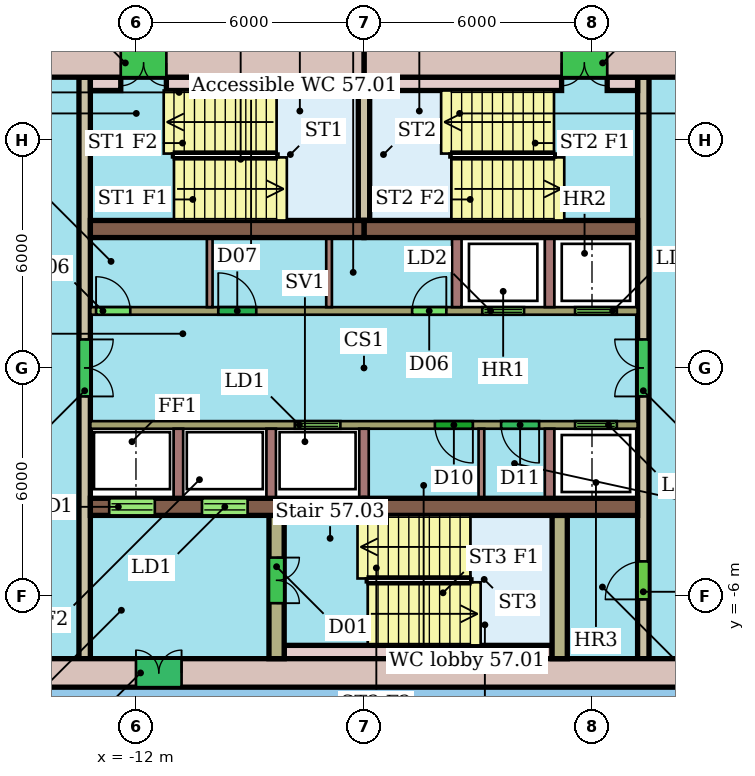
"""IFC4 building model, lengths in metres.
Left out: names, types, materials, properties, quantities, classifications, styles, units other than length and angle.
Written with IfcOpenShell. Run it as: python <this file> out.ifc"""

import sys

from ifc_helpers import new_model, si_unit, direction, frame, frame_2d, origin, place, context, subcontext, project, spatial, rectangle, extrude, element, fill, save


model = new_model("IFC4")
c1 = context("Model", 3, precision=1e-05, world=origin(), true_north=direction((0.0, 1.0)))
c2 = subcontext(c1, "Body", "Model", "MODEL_VIEW")
j1 = project(units=[si_unit("LENGTHUNIT", "METRE"), si_unit("PLANEANGLEUNIT", "RADIAN")], contexts=[c1])
p1 = place(None, origin())
s1 = spatial("IfcSite", under=j1, at=p1, CompositionType="ELEMENT")
p2 = place(p1, origin())
s2 = spatial("IfcBuilding", under=s1, at=p2, CompositionType="ELEMENT")
p3 = place(p2, frame((0.0, 0.0, 231.7)))
s3 = spatial("IfcBuildingStorey", under=s2, at=p3, CompositionType="ELEMENT", Elevation=231.7)
p4 = place(p3, frame((4.8, 8.025, 0.0), z_axis=(0.0, 0.0, 1.0), x_axis=(-1.0, 0.0, 0.0)))
e1 = element("IfcWall", 1, at=p4, inside=s3, PredefinedType="SHEAR", context=c2, shape_type="SweptSolid", body=[
    extrude(rectangle(XDim=10.8, YDim=0.75, at=frame_2d((5.4, 0.0))), origin(), (0.0, 0.0, 1.0), 3.3),
])
p5 = place(p4, frame((4.4, 0.0, 0.0)))
e2 = element("IfcOpeningElement", 2, at=p5, cuts=e1, PredefinedType="OPENING", context=c2, shape_type="SweptSolid", body=[
    extrude(rectangle(XDim=1.2, YDim=2.1, at=frame_2d((0.6, 1.05))), frame((0.0, 0.385, 0.0), z_axis=(0.0, -1.0, 0.0), x_axis=(1.0, 0.0, 0.0)), (0.0, 0.0, 1.0), 0.77),
])
p6 = place(p3, frame((-6.0, 8.025, 0.0), z_axis=(0.0, 0.0, 1.0), x_axis=(-1.0, 0.0, 0.0)))
e3 = element("IfcWall", 3, at=p6, inside=s3, PredefinedType="SHEAR", context=c2, shape_type="SweptSolid", body=[
    extrude(rectangle(XDim=10.8, YDim=0.75, at=frame_2d((5.4, 0.0))), origin(), (0.0, 0.0, 1.0), 3.3),
])
p7 = place(p6, frame((5.2, 0.0, 0.0)))
e4 = element("IfcOpeningElement", 4, at=p7, cuts=e3, PredefinedType="OPENING", context=c2, shape_type="SweptSolid", body=[
    extrude(rectangle(XDim=1.2, YDim=2.1, at=frame_2d((0.6, 1.05))), frame((0.0, 0.385, 0.0), z_axis=(0.0, -1.0, 0.0), x_axis=(1.0, 0.0, 0.0)), (0.0, 0.0, 1.0), 0.77),
])
p8 = place(p3, frame((-16.8, -8.025, 0.0), z_axis=(0.0, 0.0, 1.0), x_axis=(1.0, 0.0, 0.0)))
e5 = element("IfcWall", 5, at=p8, inside=s3, PredefinedType="SHEAR", context=c2, shape_type="SweptSolid", body=[
    extrude(rectangle(XDim=21.6, YDim=0.75, at=frame_2d((10.8, 0.0))), origin(), (0.0, 0.0, 1.0), 3.3),
])
p9 = place(p8, frame((4.8, 0.0, 0.0)))
e6 = element("IfcOpeningElement", 6, at=p9, cuts=e5, PredefinedType="OPENING", context=c2, shape_type="SweptSolid", body=[
    extrude(rectangle(XDim=1.2, YDim=2.1, at=frame_2d((0.6, 1.05))), frame((0.0, 0.385, 0.0), z_axis=(0.0, -1.0, 0.0), x_axis=(1.0, 0.0, 0.0)), (0.0, 0.0, 1.0), 0.77),
])
for number, where, z_axis, x_axis in (
    (7, (-13.2, 3.655, 0.0), (0.0, 0.0, 1.0), (1.0, 0.0, 0.0)),
    (8, (-6.0, 3.655, 0.0), (0.0, 0.0, 1.0), (1.0, 0.0, 0.0)),
):
    element("IfcWall", number, at=place(p3, frame(where, z_axis=z_axis, x_axis=x_axis)), inside=s3, PredefinedType="SHEAR", context=c2, shape_type="SweptSolid", body=[
        extrude(rectangle(XDim=7.2, YDim=0.45, at=frame_2d((3.6, 0.0))), origin(), (0.0, 0.0, 1.0), 3.3),
    ])
p10 = place(p3, frame((-13.2, -3.655, 0.0), z_axis=(0.0, 0.0, 1.0), x_axis=(1.0, 0.0, 0.0)))
e9 = element("IfcWall", 9, at=p10, inside=s3, PredefinedType="SHEAR", context=c2, shape_type="SweptSolid", body=[
    extrude(rectangle(XDim=7.2, YDim=0.45, at=frame_2d((3.6, 0.0))), origin(), (0.0, 0.0, 1.0), 3.3),
])
p11 = place(p10, frame((0.496, 0.0, 0.0)))
e10 = element("IfcOpeningElement", 10, at=p11, cuts=e9, PredefinedType="OPENING", context=c2, shape_type="SweptSolid", body=[
    extrude(rectangle(XDim=1.2, YDim=2.1, at=frame_2d((0.6, 1.05))), frame((0.0, 0.235, 0.0), z_axis=(0.0, -1.0, 0.0), x_axis=(1.0, 0.0, 0.0)), (0.0, 0.0, 1.0), 0.47),
])
p12 = place(p10, frame((2.938, 0.0, 0.0)))
e11 = element("IfcOpeningElement", 11, at=p12, cuts=e9, PredefinedType="OPENING", context=c2, shape_type="SweptSolid", body=[
    extrude(rectangle(XDim=1.2, YDim=2.1, at=frame_2d((0.6, 1.05))), frame((0.0, 0.235, 0.0), z_axis=(0.0, -1.0, 0.0), x_axis=(1.0, 0.0, 0.0)), (0.0, 0.0, 1.0), 0.47),
])
p13 = place(p3, frame((-6.0, -3.655, 0.0), z_axis=(0.0, 0.0, 1.0), x_axis=(1.0, 0.0, 0.0)))
e12 = element("IfcWall", 12, at=p13, inside=s3, PredefinedType="SHEAR", context=c2, shape_type="SweptSolid", body=[
    extrude(rectangle(XDim=7.2, YDim=0.45, at=frame_2d((3.6, 0.0))), origin(), (0.0, 0.0, 1.0), 3.3),
])
p14 = place(p3, frame((-13.35, 7.65, 0.0), z_axis=(0.0, 0.0, 1.0), x_axis=(0.0, -1.0, 0.0)))
e13 = element("IfcWall", 13, at=p14, inside=s3, PredefinedType="SHEAR", context=c2, shape_type="SweptSolid", body=[
    extrude(rectangle(XDim=15.3, YDim=0.3, at=frame_2d((7.65, 0.0))), origin(), (0.0, 0.0, 1.0), 3.3),
])
p15 = place(p14, frame((6.9, 0.0, 0.0)))
e14 = element("IfcOpeningElement", 14, at=p15, cuts=e13, PredefinedType="OPENING", context=c2, shape_type="SweptSolid", body=[
    extrude(rectangle(XDim=1.5, YDim=2.1, at=frame_2d((0.75, 1.05))), frame((0.0, 0.16, 0.0), z_axis=(0.0, -1.0, 0.0), x_axis=(1.0, 0.0, 0.0)), (0.0, 0.0, 1.0), 0.32),
])
p16 = place(p3, frame((1.35, -7.65, 0.0), z_axis=(0.0, 0.0, 1.0), x_axis=(0.0, 1.0, 0.0)))
e15 = element("IfcWall", 15, at=p16, inside=s3, PredefinedType="SHEAR", context=c2, shape_type="SweptSolid", body=[
    extrude(rectangle(XDim=15.3, YDim=0.3, at=frame_2d((7.65, 0.0))), origin(), (0.0, 0.0, 1.0), 3.3),
])
p17 = place(p16, frame((1.56, 0.0, 0.0)))
e16 = element("IfcOpeningElement", 16, at=p17, cuts=e15, PredefinedType="OPENING", context=c2, shape_type="SweptSolid", body=[
    extrude(rectangle(XDim=1.0, YDim=2.1, at=frame_2d((0.5, 1.05))), frame((0.0, 0.16, 0.0), z_axis=(0.0, -1.0, 0.0), x_axis=(1.0, 0.0, 0.0)), (0.0, 0.0, 1.0), 0.32),
])
p18 = place(p16, frame((6.9, 0.0, 0.0)))
e17 = element("IfcOpeningElement", 17, at=p18, cuts=e15, PredefinedType="OPENING", context=c2, shape_type="SweptSolid", body=[
    extrude(rectangle(XDim=1.5, YDim=2.1, at=frame_2d((0.75, 1.05))), frame((0.0, 0.16, 0.0), z_axis=(0.0, -1.0, 0.0), x_axis=(1.0, 0.0, 0.0)), (0.0, 0.0, 1.0), 0.32),
])
p19 = place(p3, frame((-13.2, 1.5, 0.0), z_axis=(0.0, 0.0, 1.0), x_axis=(1.0, 0.0, 0.0)))
e18 = element("IfcWall", 18, at=p19, inside=s3, PredefinedType="SHEAR", context=c2, shape_type="SweptSolid", body=[
    extrude(rectangle(XDim=14.4, YDim=0.2, at=frame_2d((7.2, 0.0))), origin(), (0.0, 0.0, 1.0), 3.3),
])
p20 = place(p19, frame((10.312, 0.0, 0.0)))
e19 = element("IfcOpeningElement", 19, at=p20, cuts=e18, PredefinedType="OPENING", context=c2, shape_type="SweptSolid", body=[
    extrude(rectangle(XDim=1.1, YDim=2.1, at=frame_2d((0.55, 1.05))), frame((0.0, 0.11, 0.0), z_axis=(0.0, -1.0, 0.0), x_axis=(1.0, 0.0, 0.0)), (0.0, 0.0, 1.0), 0.22),
])
p21 = place(p19, frame((12.754, 0.0, 0.0)))
e20 = element("IfcOpeningElement", 20, at=p21, cuts=e18, PredefinedType="OPENING", context=c2, shape_type="SweptSolid", body=[
    extrude(rectangle(XDim=1.1, YDim=2.1, at=frame_2d((0.55, 1.05))), frame((0.0, 0.11, 0.0), z_axis=(0.0, -1.0, 0.0), x_axis=(1.0, 0.0, 0.0)), (0.0, 0.0, 1.0), 0.22),
])
p22 = place(p19, frame((0.15, 0.0, 0.0)))
e21 = element("IfcOpeningElement", 21, at=p22, cuts=e18, PredefinedType="OPENING", context=c2, shape_type="SweptSolid", body=[
    extrude(rectangle(XDim=0.9, YDim=2.1, at=frame_2d((0.45, 1.05))), frame((0.0, 0.11, 0.0), z_axis=(0.0, -1.0, 0.0), x_axis=(1.0, 0.0, 0.0)), (0.0, 0.0, 1.0), 0.22),
])
p23 = place(p19, frame((3.365, 0.0, 0.0)))
e22 = element("IfcOpeningElement", 22, at=p23, cuts=e18, PredefinedType="OPENING", context=c2, shape_type="SweptSolid", body=[
    extrude(rectangle(XDim=1.0, YDim=2.1, at=frame_2d((0.5, 1.05))), frame((0.0, 0.11, 0.0), z_axis=(0.0, -1.0, 0.0), x_axis=(1.0, 0.0, 0.0)), (0.0, 0.0, 1.0), 0.22),
])
p24 = place(p19, frame((8.467, 0.0, 0.0)))
e23 = element("IfcOpeningElement", 23, at=p24, cuts=e18, PredefinedType="OPENING", context=c2, shape_type="SweptSolid", body=[
    extrude(rectangle(XDim=0.9, YDim=2.1, at=frame_2d((0.45, 1.05))), frame((0.0, 0.11, 0.0), z_axis=(0.0, -1.0, 0.0), x_axis=(1.0, 0.0, 0.0)), (0.0, 0.0, 1.0), 0.22),
])
p25 = place(p3, frame((1.2, -1.5, 0.0), z_axis=(0.0, 0.0, 1.0), x_axis=(-1.0, 0.0, 0.0)))
e24 = element("IfcWall", 24, at=p25, inside=s3, PredefinedType="SHEAR", context=c2, shape_type="SweptSolid", body=[
    extrude(rectangle(XDim=14.4, YDim=0.2, at=frame_2d((7.2, 0.0))), origin(), (0.0, 0.0, 1.0), 3.3),
])
p26 = place(p25, frame((7.821, 0.0, 0.0)))
e25 = element("IfcOpeningElement", 25, at=p26, cuts=e24, PredefinedType="OPENING", context=c2, shape_type="SweptSolid", body=[
    extrude(rectangle(XDim=1.2, YDim=2.1, at=frame_2d((0.6, 1.05))), frame((0.0, 0.11, 0.0), z_axis=(0.0, -1.0, 0.0), x_axis=(1.0, 0.0, 0.0)), (0.0, 0.0, 1.0), 0.22),
])
p27 = place(p25, frame((0.546, 0.0, 0.0)))
e26 = element("IfcOpeningElement", 26, at=p27, cuts=e24, PredefinedType="OPENING", context=c2, shape_type="SweptSolid", body=[
    extrude(rectangle(XDim=1.1, YDim=2.1, at=frame_2d((0.55, 1.05))), frame((0.0, 0.11, 0.0), z_axis=(0.0, -1.0, 0.0), x_axis=(1.0, 0.0, 0.0)), (0.0, 0.0, 1.0), 0.22),
])
p28 = place(p25, frame((4.335, 0.0, 0.0)))
e27 = element("IfcOpeningElement", 27, at=p28, cuts=e24, PredefinedType="OPENING", context=c2, shape_type="SweptSolid", body=[
    extrude(rectangle(XDim=1.0, YDim=2.1, at=frame_2d((0.5, 1.05))), frame((0.0, 0.11, 0.0), z_axis=(0.0, -1.0, 0.0), x_axis=(1.0, 0.0, 0.0)), (0.0, 0.0, 1.0), 0.22),
])
p29 = place(p25, frame((2.592, 0.0, 0.0)))
e28 = element("IfcOpeningElement", 28, at=p29, cuts=e24, PredefinedType="OPENING", context=c2, shape_type="SweptSolid", body=[
    extrude(rectangle(XDim=1.0, YDim=2.1, at=frame_2d((0.5, 1.05))), frame((0.0, 0.11, 0.0), z_axis=(0.0, -1.0, 0.0), x_axis=(1.0, 0.0, 0.0)), (0.0, 0.0, 1.0), 0.22),
])
p30 = place(p3, frame((-8.3, -3.88, 0.0), z_axis=(0.0, 0.0, 1.0), x_axis=(0.0, -1.0, 0.0)))
e29 = element("IfcWall", 29, at=p30, inside=s3, PredefinedType="SHEAR", context=c2, shape_type="SweptSolid", body=[
    extrude(rectangle(XDim=3.77, YDim=0.4, at=frame_2d((1.885, 0.0))), origin(), (0.0, 0.0, 1.0), 3.3),
])
p31 = place(p30, frame((1.11, 0.0, 0.0)))
e30 = element("IfcOpeningElement", 30, at=p31, cuts=e29, PredefinedType="OPENING", context=c2, shape_type="SweptSolid", body=[
    extrude(rectangle(XDim=1.2, YDim=2.1, at=frame_2d((0.6, 1.05))), frame((0.0, 0.21, 0.0), z_axis=(0.0, -1.0, 0.0), x_axis=(1.0, 0.0, 0.0)), (0.0, 0.0, 1.0), 0.42),
])
p32 = place(p3, frame((-0.85, -3.88, 0.0), z_axis=(0.0, 0.0, 1.0), x_axis=(0.0, -1.0, 0.0)))
e31 = element("IfcWall", 31, at=p32, inside=s3, PredefinedType="SHEAR", context=c2, shape_type="SweptSolid", body=[
    extrude(rectangle(XDim=3.77, YDim=0.4, at=frame_2d((1.885, 0.0))), origin(), (0.0, 0.0, 1.0), 3.3),
])
p33 = place(p3, frame((-6.0, 3.88, 0.0), z_axis=(0.0, 0.0, 1.0), x_axis=(0.0, 1.0, 0.0)))
e32 = element("IfcWall", 32, at=p33, inside=s3, PredefinedType="SHEAR", context=c2, shape_type="SweptSolid", body=[
    extrude(rectangle(XDim=3.77, YDim=0.3, at=frame_2d((1.885, 0.0))), origin(), (0.0, 0.0, 1.0), 3.3),
])
p34 = place(p3, frame((-13.2, 7.475, 0.0), z_axis=(0.0, 0.0, 1.0), x_axis=(1.0, 0.0, 0.0)))
e33 = element("IfcWall", 33, at=p34, inside=s3, PredefinedType="SHEAR", context=c2, shape_type="SweptSolid", body=[
    extrude(rectangle(XDim=0.8, YDim=0.35, at=frame_2d((0.4, 0.0))), origin(), (0.0, 0.0, 1.0), 3.3),
])
for number, where, z_axis, x_axis in (
    (34, (-11.2, 7.475, 0.0), (0.0, 0.0, 1.0), (1.0, 0.0, 0.0)),
    (35, (-5.85, 7.475, 0.0), (0.0, 0.0, 1.0), (1.0, 0.0, 0.0)),
):
    element("IfcWall", number, at=place(p3, frame(where, z_axis=z_axis, x_axis=x_axis)), inside=s3, PredefinedType="SHEAR", context=c2, shape_type="SweptSolid", body=[
        extrude(rectangle(XDim=5.05, YDim=0.35, at=frame_2d((2.525, 0.0))), origin(), (0.0, 0.0, 1.0), 3.3),
    ])
p35 = place(p3, frame((0.4, 7.475, 0.0), z_axis=(0.0, 0.0, 1.0), x_axis=(1.0, 0.0, 0.0)))
e36 = element("IfcWall", 36, at=p35, inside=s3, PredefinedType="SHEAR", context=c2, shape_type="SweptSolid", body=[
    extrude(rectangle(XDim=0.8, YDim=0.35, at=frame_2d((0.4, 0.0))), origin(), (0.0, 0.0, 1.0), 3.3),
])
p36 = place(p3, frame((-8.1, -7.475, 0.0), z_axis=(0.0, 0.0, 1.0), x_axis=(1.0, 0.0, 0.0)))
e37 = element("IfcWall", 37, at=p36, inside=s3, PredefinedType="SHEAR", context=c2, shape_type="SweptSolid", body=[
    extrude(rectangle(XDim=7.05, YDim=0.35, at=frame_2d((3.525, 0.0))), origin(), (0.0, 0.0, 1.0), 3.3),
])
for number, where, z_axis, x_axis in (
    (38, (-3.558, 1.6, 0.0), (0.0, 0.0, 1.0), (0.0, 1.0, 0.0)),
    (39, (-1.117, 1.6, 0.0), (0.0, 0.0, 1.0), (0.0, 1.0, 0.0)),
):
    element("IfcWall", number, at=place(p3, frame(where, z_axis=z_axis, x_axis=x_axis)), inside=s3, PredefinedType="SHEAR", context=c2, shape_type="SweptSolid", body=[
        extrude(rectangle(XDim=1.83, YDim=0.25, at=frame_2d((0.915, 0.0))), origin(), (0.0, 0.0, 1.0), 3.3),
    ])
for number, where, z_axis, x_axis in (
    (40, (-10.06, 1.6, 0.0), (0.0, 0.0, 1.0), (0.0, 1.0, 0.0)),
    (41, (-6.919, 1.6, 0.0), (0.0, 0.0, 1.0), (0.0, 1.0, 0.0)),
):
    element("IfcWall", number, at=place(p3, frame(where, z_axis=z_axis, x_axis=x_axis)), inside=s3, PredefinedType="PARTITIONING", context=c2, shape_type="SweptSolid", body=[
        extrude(rectangle(XDim=1.83, YDim=0.15, at=frame_2d((0.915, 0.0))), origin(), (0.0, 0.0, 1.0), 3.3),
    ])
for number, where, z_axis, x_axis in (
    (42, (-10.883, -1.6, 0.0), (0.0, 0.0, 1.0), (0.0, -1.0, 0.0)),
    (43, (-8.442, -1.6, 0.0), (0.0, 0.0, 1.0), (0.0, -1.0, 0.0)),
    (44, (-6.0, -1.6, 0.0), (0.0, 0.0, 1.0), (0.0, -1.0, 0.0)),
    (45, (-1.117, -1.6, 0.0), (0.0, 0.0, 1.0), (0.0, -1.0, 0.0)),
):
    element("IfcWall", number, at=place(p3, frame(where, z_axis=z_axis, x_axis=x_axis)), inside=s3, PredefinedType="SHEAR", context=c2, shape_type="SweptSolid", body=[
        extrude(rectangle(XDim=1.83, YDim=0.25, at=frame_2d((0.915, 0.0))), origin(), (0.0, 0.0, 1.0), 3.3),
    ])
p37 = place(p3, frame((-2.91, -1.6, 0.0), z_axis=(0.0, 0.0, 1.0), x_axis=(0.0, -1.0, 0.0)))
e46 = element("IfcWall", 46, at=p37, inside=s3, PredefinedType="PARTITIONING", context=c2, shape_type="SweptSolid", body=[
    extrude(rectangle(XDim=1.83, YDim=0.15, at=frame_2d((0.915, 0.0))), origin(), (0.0, 0.0, 1.0), 3.3),
])
p38 = place(p5, origin())
e47 = element("IfcDoor", 47, at=p38, inside=s3, OperationType="DOUBLE_DOOR_SINGLE_SWING", PredefinedType="NOTDEFINED", context=c2, shape_type="SweptSolid", body=[
    extrude(rectangle(XDim=1.2, YDim=2.1, at=frame_2d((0.6, 1.05))), frame((0.0, 0.025, 0.0), z_axis=(0.0, -1.0, 0.0), x_axis=(1.0, 0.0, 0.0)), (0.0, 0.0, 1.0), 0.05),
])
fill(e2, e47)
p39 = place(p7, origin())
e48 = element("IfcDoor", 48, at=p39, inside=s3, OperationType="DOUBLE_DOOR_SINGLE_SWING", PredefinedType="NOTDEFINED", context=c2, shape_type="SweptSolid", body=[
    extrude(rectangle(XDim=1.2, YDim=2.1, at=frame_2d((0.6, 1.05))), frame((0.0, 0.025, 0.0), z_axis=(0.0, -1.0, 0.0), x_axis=(1.0, 0.0, 0.0)), (0.0, 0.0, 1.0), 0.05),
])
fill(e4, e48)
p40 = place(p9, origin())
e49 = element("IfcDoor", 49, at=p40, inside=s3, OperationType="DOUBLE_DOOR_SINGLE_SWING", PredefinedType="NOTDEFINED", context=c2, shape_type="SweptSolid", body=[
    extrude(rectangle(XDim=1.2, YDim=2.1, at=frame_2d((0.6, 1.05))), frame((0.0, 0.025, 0.0), z_axis=(0.0, -1.0, 0.0), x_axis=(1.0, 0.0, 0.0)), (0.0, 0.0, 1.0), 0.05),
])
fill(e6, e49)
p41 = place(p11, origin())
e50 = element("IfcDoor", 50, at=p41, inside=s3, OperationType="DOUBLE_DOOR_SLIDING", PredefinedType="NOTDEFINED", context=c2, shape_type="SweptSolid", body=[
    extrude(rectangle(XDim=1.2, YDim=2.1, at=frame_2d((0.6, 1.05))), frame((0.0, 0.025, 0.0), z_axis=(0.0, -1.0, 0.0), x_axis=(1.0, 0.0, 0.0)), (0.0, 0.0, 1.0), 0.05),
])
fill(e10, e50)
p42 = place(p12, origin())
e51 = element("IfcDoor", 51, at=p42, inside=s3, OperationType="DOUBLE_DOOR_SLIDING", PredefinedType="NOTDEFINED", context=c2, shape_type="SweptSolid", body=[
    extrude(rectangle(XDim=1.2, YDim=2.1, at=frame_2d((0.6, 1.05))), frame((0.0, 0.025, 0.0), z_axis=(0.0, -1.0, 0.0), x_axis=(1.0, 0.0, 0.0)), (0.0, 0.0, 1.0), 0.05),
])
fill(e11, e51)
p43 = place(p15, origin())
e52 = element("IfcDoor", 52, at=p43, inside=s3, OperationType="DOUBLE_DOOR_SINGLE_SWING", PredefinedType="NOTDEFINED", context=c2, shape_type="SweptSolid", body=[
    extrude(rectangle(XDim=1.5, YDim=2.1, at=frame_2d((0.75, 1.05))), frame((0.0, 0.025, 0.0), z_axis=(0.0, -1.0, 0.0), x_axis=(1.0, 0.0, 0.0)), (0.0, 0.0, 1.0), 0.05),
])
fill(e14, e52)
p44 = place(p17, origin())
e53 = element("IfcDoor", 53, at=p44, inside=s3, OperationType="SINGLE_SWING_LEFT", PredefinedType="NOTDEFINED", context=c2, shape_type="SweptSolid", body=[
    extrude(rectangle(XDim=1.0, YDim=2.1, at=frame_2d((0.5, 1.05))), frame((0.0, 0.025, 0.0), z_axis=(0.0, -1.0, 0.0), x_axis=(1.0, 0.0, 0.0)), (0.0, 0.0, 1.0), 0.05),
])
fill(e16, e53)
p45 = place(p18, origin())
e54 = element("IfcDoor", 54, at=p45, inside=s3, OperationType="DOUBLE_DOOR_SINGLE_SWING", PredefinedType="NOTDEFINED", context=c2, shape_type="SweptSolid", body=[
    extrude(rectangle(XDim=1.5, YDim=2.1, at=frame_2d((0.75, 1.05))), frame((0.0, 0.025, 0.0), z_axis=(0.0, -1.0, 0.0), x_axis=(1.0, 0.0, 0.0)), (0.0, 0.0, 1.0), 0.05),
])
fill(e17, e54)
p46 = place(p20, origin())
e55 = element("IfcDoor", 55, at=p46, inside=s3, OperationType="DOUBLE_DOOR_SLIDING", PredefinedType="NOTDEFINED", context=c2, shape_type="SweptSolid", body=[
    extrude(rectangle(XDim=1.1, YDim=2.1, at=frame_2d((0.55, 1.05))), frame((0.0, 0.025, 0.0), z_axis=(0.0, -1.0, 0.0), x_axis=(1.0, 0.0, 0.0)), (0.0, 0.0, 1.0), 0.05),
])
fill(e19, e55)
p47 = place(p21, origin())
e56 = element("IfcDoor", 56, at=p47, inside=s3, OperationType="DOUBLE_DOOR_SLIDING", PredefinedType="NOTDEFINED", context=c2, shape_type="SweptSolid", body=[
    extrude(rectangle(XDim=1.1, YDim=2.1, at=frame_2d((0.55, 1.05))), frame((0.0, 0.025, 0.0), z_axis=(0.0, -1.0, 0.0), x_axis=(1.0, 0.0, 0.0)), (0.0, 0.0, 1.0), 0.05),
])
fill(e20, e56)
p48 = place(p22, origin())
e57 = element("IfcDoor", 57, at=p48, inside=s3, OperationType="SINGLE_SWING_LEFT", PredefinedType="NOTDEFINED", context=c2, shape_type="SweptSolid", body=[
    extrude(rectangle(XDim=0.9, YDim=2.1, at=frame_2d((0.45, 1.05))), frame((0.0, 0.025, 0.0), z_axis=(0.0, -1.0, 0.0), x_axis=(1.0, 0.0, 0.0)), (0.0, 0.0, 1.0), 0.05),
])
fill(e21, e57)
p49 = place(p23, origin())
e58 = element("IfcDoor", 58, at=p49, inside=s3, OperationType="SINGLE_SWING_LEFT", PredefinedType="NOTDEFINED", context=c2, shape_type="SweptSolid", body=[
    extrude(rectangle(XDim=1.0, YDim=2.1, at=frame_2d((0.5, 1.05))), frame((0.0, 0.025, 0.0), z_axis=(0.0, -1.0, 0.0), x_axis=(1.0, 0.0, 0.0)), (0.0, 0.0, 1.0), 0.05),
])
fill(e22, e58)
p50 = place(p24, origin())
e59 = element("IfcDoor", 59, at=p50, inside=s3, OperationType="SINGLE_SWING_RIGHT", PredefinedType="NOTDEFINED", context=c2, shape_type="SweptSolid", body=[
    extrude(rectangle(XDim=0.9, YDim=2.1, at=frame_2d((0.45, 1.05))), frame((0.0, 0.025, 0.0), z_axis=(0.0, -1.0, 0.0), x_axis=(1.0, 0.0, 0.0)), (0.0, 0.0, 1.0), 0.05),
])
fill(e23, e59)
p51 = place(p26, origin())
e60 = element("IfcDoor", 60, at=p51, inside=s3, OperationType="DOUBLE_DOOR_SLIDING", PredefinedType="NOTDEFINED", context=c2, shape_type="SweptSolid", body=[
    extrude(rectangle(XDim=1.2, YDim=2.1, at=frame_2d((0.6, 1.05))), frame((0.0, 0.025, 0.0), z_axis=(0.0, -1.0, 0.0), x_axis=(1.0, 0.0, 0.0)), (0.0, 0.0, 1.0), 0.05),
])
fill(e25, e60)
p52 = place(p27, origin())
e61 = element("IfcDoor", 61, at=p52, inside=s3, OperationType="DOUBLE_DOOR_SLIDING", PredefinedType="NOTDEFINED", context=c2, shape_type="SweptSolid", body=[
    extrude(rectangle(XDim=1.1, YDim=2.1, at=frame_2d((0.55, 1.05))), frame((0.0, 0.025, 0.0), z_axis=(0.0, -1.0, 0.0), x_axis=(1.0, 0.0, 0.0)), (0.0, 0.0, 1.0), 0.05),
])
fill(e26, e61)
p53 = place(p28, origin())
e62 = element("IfcDoor", 62, at=p53, inside=s3, OperationType="SINGLE_SWING_LEFT", PredefinedType="NOTDEFINED", context=c2, shape_type="SweptSolid", body=[
    extrude(rectangle(XDim=1.0, YDim=2.1, at=frame_2d((0.5, 1.05))), frame((0.0, 0.025, 0.0), z_axis=(0.0, -1.0, 0.0), x_axis=(1.0, 0.0, 0.0)), (0.0, 0.0, 1.0), 0.05),
])
fill(e27, e62)
p54 = place(p29, origin())
e63 = element("IfcDoor", 63, at=p54, inside=s3, OperationType="SINGLE_SWING_LEFT", PredefinedType="NOTDEFINED", context=c2, shape_type="SweptSolid", body=[
    extrude(rectangle(XDim=1.0, YDim=2.1, at=frame_2d((0.5, 1.05))), frame((0.0, 0.025, 0.0), z_axis=(0.0, -1.0, 0.0), x_axis=(1.0, 0.0, 0.0)), (0.0, 0.0, 1.0), 0.05),
])
fill(e28, e63)
p55 = place(p31, origin())
e64 = element("IfcDoor", 64, at=p55, inside=s3, OperationType="DOUBLE_DOOR_SINGLE_SWING", PredefinedType="NOTDEFINED", context=c2, shape_type="SweptSolid", body=[
    extrude(rectangle(XDim=1.2, YDim=2.1, at=frame_2d((0.6, 1.05))), frame((0.0, 0.025, 0.0), z_axis=(0.0, -1.0, 0.0), x_axis=(1.0, 0.0, 0.0)), (0.0, 0.0, 1.0), 0.05),
])
fill(e30, e64)
save(model, sys.argv[1])
